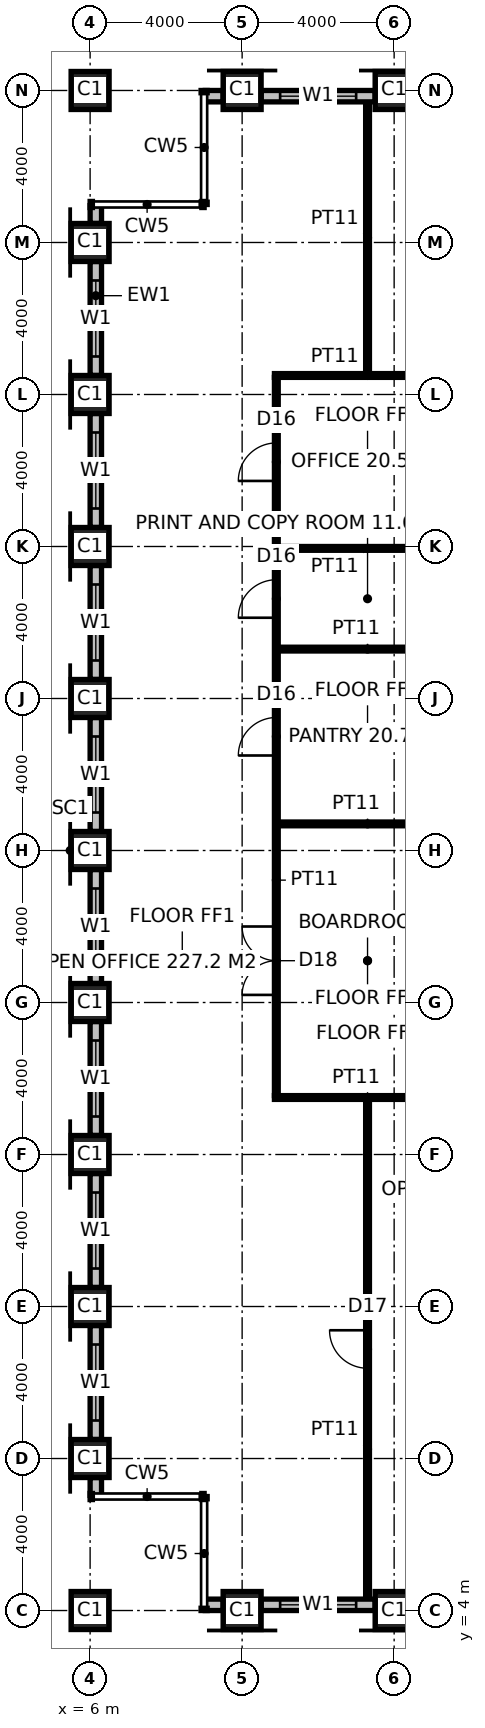
"""IFC4 building model, lengths in metres.
Left out: names, types, materials, properties, quantities, classifications, styles, units other than length and angle.
Written with IfcOpenShell. Run it as: python <this file> out.ifc"""

import sys

from ifc_helpers import new_model, si_unit, direction, frame, frame_2d, origin, origin_2d, place, context, subcontext, project, spatial, rectangle, hollow_rectangle, extrude, element, fill, save


model = new_model("IFC4")
c1 = context("Model", 3, precision=1e-05, world=origin(), true_north=direction((0.0, 1.0)))
c2 = subcontext(c1, "Body", "Model", "MODEL_VIEW")
j1 = project(units=[si_unit("LENGTHUNIT", "METRE"), si_unit("PLANEANGLEUNIT", "RADIAN")], contexts=[c1])
p1 = place(None, origin())
s1 = spatial("IfcSite", under=j1, at=p1, CompositionType="ELEMENT")
p2 = place(p1, origin())
s2 = spatial("IfcBuilding", under=s1, at=p2, CompositionType="ELEMENT")
p3 = place(p2, frame((0.0, 0.0, 274.2)))
s3 = spatial("IfcBuildingStorey", under=s2, at=p3, CompositionType="ELEMENT", Elevation=274.2)
for number, where, z_axis, x_axis in (
    (1, (6.0, 4.0, 0.0), (0.0, 0.0, 1.0), (1.0, 0.0, 0.0)),
    (2, (6.0, 8.0, 0.0), (0.0, 0.0, 1.0), (1.0, 0.0, 0.0)),
    (3, (6.0, 12.0, 0.0), (0.0, 0.0, 1.0), (1.0, 0.0, 0.0)),
    (4, (6.0, 16.0, 0.0), (0.0, 0.0, 1.0), (1.0, 0.0, 0.0)),
    (5, (6.0, 20.0, 0.0), (0.0, 0.0, 1.0), (1.0, 0.0, 0.0)),
    (6, (6.0, 24.0, 0.0), (0.0, 0.0, 1.0), (1.0, 0.0, 0.0)),
    (7, (6.0, 28.0, 0.0), (0.0, 0.0, 1.0), (1.0, 0.0, 0.0)),
    (8, (6.0, 32.0, 0.0), (0.0, 0.0, 1.0), (1.0, 0.0, 0.0)),
    (9, (6.0, 36.0, 0.0), (0.0, 0.0, 1.0), (1.0, 0.0, 0.0)),
    (10, (6.0, 40.0, 0.0), (0.0, 0.0, 1.0), (1.0, 0.0, 0.0)),
    (11, (6.0, 44.0, 0.0), (0.0, 0.0, 1.0), (1.0, 0.0, 0.0)),
    (12, (10.0, 4.0, 0.0), (0.0, 0.0, 1.0), (1.0, 0.0, 0.0)),
    (13, (10.0, 44.0, 0.0), (0.0, 0.0, 1.0), (1.0, 0.0, 0.0)),
    (14, (14.0, 4.0, 0.0), (0.0, 0.0, 1.0), (1.0, 0.0, 0.0)),
    (15, (14.0, 44.0, 0.0), (0.0, 0.0, 1.0), (1.0, 0.0, 0.0)),
):
    element("IfcColumn", number, at=place(p3, frame(where, z_axis=z_axis, x_axis=x_axis)), inside=s3, PredefinedType="COLUMN", context=c2, shape_type="SweptSolid", body=[
        extrude(hollow_rectangle(XDim=1.0, YDim=1.0, WallThickness=0.1, at=origin_2d()), origin(), (0.0, 0.0, 1.0), 4.0),
    ])
p4 = place(p3, frame((10.85, 17.5, 0.0), z_axis=(0.0, 0.0, 1.0), x_axis=(1.0, 0.0, 0.0)))
e16 = element("IfcWall", 16, at=p4, inside=s3, PredefinedType="PARTITIONING", context=c2, shape_type="SweptSolid", body=[
    extrude(rectangle(XDim=4.9, YDim=0.1, at=frame_2d((2.45, 0.0))), origin(), (0.0, 0.0, 1.0), 3.85),
])
for number, where, z_axis, x_axis in (
    (17, (10.95, 24.7, 0.0), (0.0, 0.0, 1.0), (1.0, 0.0, 0.0)),
    (18, (10.95, 29.3, 0.0), (0.0, 0.0, 1.0), (1.0, 0.0, 0.0)),
):
    element("IfcWall", number, at=place(p3, frame(where, z_axis=z_axis, x_axis=x_axis)), inside=s3, PredefinedType="PARTITIONING", context=c2, shape_type="SweptSolid", body=[
        extrude(rectangle(XDim=4.7, YDim=0.1, at=frame_2d((2.35, 0.0))), origin(), (0.0, 0.0, 1.0), 3.85),
    ])
p5 = place(p3, frame((10.95, 31.95, 0.0), z_axis=(0.0, 0.0, 1.0), x_axis=(1.0, 0.0, 0.0)))
e19 = element("IfcWall", 19, at=p5, inside=s3, PredefinedType="PARTITIONING", context=c2, shape_type="SweptSolid", body=[
    extrude(rectangle(XDim=4.7, YDim=0.1, at=frame_2d((2.35, 0.0))), origin(), (0.0, 0.0, 1.0), 2.95),
])
p6 = place(p3, frame((10.85, 36.5, 0.0), z_axis=(0.0, 0.0, 1.0), x_axis=(1.0, 0.0, 0.0)))
e20 = element("IfcWall", 20, at=p6, inside=s3, PredefinedType="PARTITIONING", context=c2, shape_type="SweptSolid", body=[
    extrude(rectangle(XDim=4.9, YDim=0.1, at=frame_2d((2.45, 0.0))), origin(), (0.0, 0.0, 1.0), 2.85),
])
p7 = place(p3, frame((10.9, 17.55, 0.0), z_axis=(0.0, 0.0, 1.0), x_axis=(0.0, 1.0, 0.0)))
e21 = element("IfcWall", 21, at=p7, inside=s3, PredefinedType="PARTITIONING", context=c2, shape_type="SweptSolid", body=[
    extrude(rectangle(XDim=18.9, YDim=0.1, at=frame_2d((9.45, 0.0))), origin(), (0.0, 0.0, 1.0), 3.85),
])
p8 = place(p7, frame((2.65, 0.0, 0.0)))
e22 = element("IfcOpeningElement", 22, at=p8, cuts=e21, PredefinedType="OPENING", context=c2, shape_type="SweptSolid", body=[
    extrude(rectangle(XDim=1.8, YDim=2.4, at=frame_2d((0.9, 1.2))), frame((0.0, 0.06, 0.0), z_axis=(0.0, -1.0, 0.0), x_axis=(1.0, 0.0, 0.0)), (0.0, 0.0, 1.0), 0.12),
])
p9 = place(p7, frame((8.95, 0.0, 0.0)))
e23 = element("IfcOpeningElement", 23, at=p9, cuts=e21, PredefinedType="OPENING", context=c2, shape_type="SweptSolid", body=[
    extrude(rectangle(XDim=1.0, YDim=2.2, at=frame_2d((0.5, 1.1))), frame((0.0, 0.06, 0.0), z_axis=(0.0, -1.0, 0.0), x_axis=(1.0, 0.0, 0.0)), (0.0, 0.0, 1.0), 0.12),
])
p10 = place(p7, frame((12.575, 0.0, 0.0)))
e24 = element("IfcOpeningElement", 24, at=p10, cuts=e21, PredefinedType="OPENING", context=c2, shape_type="SweptSolid", body=[
    extrude(rectangle(XDim=1.0, YDim=2.2, at=frame_2d((0.5, 1.1))), frame((0.0, 0.06, 0.0), z_axis=(0.0, -1.0, 0.0), x_axis=(1.0, 0.0, 0.0)), (0.0, 0.0, 1.0), 0.12),
])
p11 = place(p7, frame((16.175, 0.0, 0.0)))
e25 = element("IfcOpeningElement", 25, at=p11, cuts=e21, PredefinedType="OPENING", context=c2, shape_type="SweptSolid", body=[
    extrude(rectangle(XDim=1.0, YDim=2.2, at=frame_2d((0.5, 1.1))), frame((0.0, 0.06, 0.0), z_axis=(0.0, -1.0, 0.0), x_axis=(1.0, 0.0, 0.0)), (0.0, 0.0, 1.0), 0.12),
])
p12 = place(p3, frame((13.3, 4.3, 0.0), z_axis=(0.0, 0.0, 1.0), x_axis=(0.0, 1.0, 0.0)))
e26 = element("IfcWall", 26, at=p12, inside=s3, PredefinedType="PARTITIONING", context=c2, shape_type="SweptSolid", body=[
    extrude(rectangle(XDim=13.15, YDim=0.1, at=frame_2d((6.575, 0.0))), origin(), (0.0, 0.0, 1.0), 3.85),
])
p13 = place(p12, frame((6.075, 0.0, 0.0)))
e27 = element("IfcOpeningElement", 27, at=p13, cuts=e26, PredefinedType="OPENING", context=c2, shape_type="SweptSolid", body=[
    extrude(rectangle(XDim=1.0, YDim=2.2, at=frame_2d((0.5, 1.1))), frame((0.0, 0.06, 0.0), z_axis=(0.0, -1.0, 0.0), x_axis=(1.0, 0.0, 0.0)), (0.0, 0.0, 1.0), 0.12),
])
p14 = place(p3, frame((13.3, 36.55, 0.0), z_axis=(0.0, 0.0, 1.0), x_axis=(0.0, 1.0, 0.0)))
e28 = element("IfcWall", 28, at=p14, inside=s3, PredefinedType="PARTITIONING", context=c2, shape_type="SweptSolid", body=[
    extrude(rectangle(XDim=7.15, YDim=0.1, at=frame_2d((3.575, 0.0))), origin(), (0.0, 0.0, 1.0), 3.85),
])
p15 = place(p3, frame((9.03, 4.15, 0.0), z_axis=(0.0, 0.0, 1.0), x_axis=(1.0, 0.0, 0.0)))
e29 = element("IfcWall", 29, at=p15, inside=s3, PredefinedType="ELEMENTEDWALL", context=c2, shape_type="SweptSolid", body=[
    extrude(rectangle(XDim=0.47, YDim=0.3, at=frame_2d((0.235, 0.0))), origin(), (0.0, 0.0, 1.0), 2.95),
])
p16 = place(p3, frame((10.5, 4.15, 0.0), z_axis=(0.0, 0.0, 1.0), x_axis=(1.0, 0.0, 0.0)))
e30 = element("IfcWall", 30, at=p16, inside=s3, PredefinedType="ELEMENTEDWALL", context=c2, shape_type="SweptSolid", body=[
    extrude(rectangle(XDim=3.0, YDim=0.3, at=frame_2d((1.5, 0.0))), origin(), (0.0, 0.0, 1.0), 2.85),
])
p17 = place(p16, frame((0.5, 0.0, 0.8)))
e31 = element("IfcOpeningElement", 31, at=p17, cuts=e30, PredefinedType="OPENING", context=c2, shape_type="SweptSolid", body=[
    extrude(rectangle(XDim=2.0, YDim=2.0, at=frame_2d((1.0, 1.0))), frame((0.0, 0.16, 0.0), z_axis=(0.0, -1.0, 0.0), x_axis=(1.0, 0.0, 0.0)), (0.0, 0.0, 1.0), 0.32),
])
p18 = place(p3, frame((9.5, 43.85, 0.0), z_axis=(0.0, 0.0, 1.0), x_axis=(-1.0, 0.0, 0.0)))
e32 = element("IfcWall", 32, at=p18, inside=s3, PredefinedType="ELEMENTEDWALL", context=c2, shape_type="SweptSolid", body=[
    extrude(rectangle(XDim=0.47, YDim=0.3, at=frame_2d((0.235, 0.0))), origin(), (0.0, 0.0, 1.0), 2.95),
])
p19 = place(p3, frame((13.5, 43.85, 0.0), z_axis=(0.0, 0.0, 1.0), x_axis=(-1.0, 0.0, 0.0)))
e33 = element("IfcWall", 33, at=p19, inside=s3, PredefinedType="ELEMENTEDWALL", context=c2, shape_type="SweptSolid", body=[
    extrude(rectangle(XDim=3.0, YDim=0.3, at=frame_2d((1.5, 0.0))), origin(), (0.0, 0.0, 1.0), 2.85),
])
p20 = place(p19, frame((0.5, 0.0, 0.8)))
e34 = element("IfcOpeningElement", 34, at=p20, cuts=e33, PredefinedType="OPENING", context=c2, shape_type="SweptSolid", body=[
    extrude(rectangle(XDim=2.0, YDim=2.0, at=frame_2d((1.0, 1.0))), frame((0.0, 0.16, 0.0), z_axis=(0.0, -1.0, 0.0), x_axis=(1.0, 0.0, 0.0)), (0.0, 0.0, 1.0), 0.32),
])
p21 = place(p3, frame((6.15, 7.5, 0.0), z_axis=(0.0, 0.0, 1.0), x_axis=(0.0, -1.0, 0.0)))
e35 = element("IfcWall", 35, at=p21, inside=s3, PredefinedType="ELEMENTEDWALL", context=c2, shape_type="SweptSolid", body=[
    extrude(rectangle(XDim=0.47, YDim=0.3, at=frame_2d((0.235, 0.0))), origin(), (0.0, 0.0, 1.0), 2.95),
])
p22 = place(p3, frame((6.15, 11.5, 0.0), z_axis=(0.0, 0.0, 1.0), x_axis=(0.0, -1.0, 0.0)))
e36 = element("IfcWall", 36, at=p22, inside=s3, PredefinedType="ELEMENTEDWALL", context=c2, shape_type="SweptSolid", body=[
    extrude(rectangle(XDim=3.0, YDim=0.3, at=frame_2d((1.5, 0.0))), origin(), (0.0, 0.0, 1.0), 2.85),
])
p23 = place(p22, frame((0.5, 0.0, 0.8)))
e37 = element("IfcOpeningElement", 37, at=p23, cuts=e36, PredefinedType="OPENING", context=c2, shape_type="SweptSolid", body=[
    extrude(rectangle(XDim=2.0, YDim=2.0, at=frame_2d((1.0, 1.0))), frame((0.0, 0.16, 0.0), z_axis=(0.0, -1.0, 0.0), x_axis=(1.0, 0.0, 0.0)), (0.0, 0.0, 1.0), 0.32),
])
p24 = place(p3, frame((6.15, 15.5, 0.0), z_axis=(0.0, 0.0, 1.0), x_axis=(0.0, -1.0, 0.0)))
e38 = element("IfcWall", 38, at=p24, inside=s3, PredefinedType="ELEMENTEDWALL", context=c2, shape_type="SweptSolid", body=[
    extrude(rectangle(XDim=3.0, YDim=0.3, at=frame_2d((1.5, 0.0))), origin(), (0.0, 0.0, 1.0), 2.85),
])
p25 = place(p24, frame((0.5, 0.0, 0.8)))
e39 = element("IfcOpeningElement", 39, at=p25, cuts=e38, PredefinedType="OPENING", context=c2, shape_type="SweptSolid", body=[
    extrude(rectangle(XDim=2.0, YDim=2.0, at=frame_2d((1.0, 1.0))), frame((0.0, 0.16, 0.0), z_axis=(0.0, -1.0, 0.0), x_axis=(1.0, 0.0, 0.0)), (0.0, 0.0, 1.0), 0.32),
])
p26 = place(p3, frame((6.15, 19.5, 0.0), z_axis=(0.0, 0.0, 1.0), x_axis=(0.0, -1.0, 0.0)))
e40 = element("IfcWall", 40, at=p26, inside=s3, PredefinedType="ELEMENTEDWALL", context=c2, shape_type="SweptSolid", body=[
    extrude(rectangle(XDim=3.0, YDim=0.3, at=frame_2d((1.5, 0.0))), origin(), (0.0, 0.0, 1.0), 2.85),
])
p27 = place(p26, frame((0.5, 0.0, 0.8)))
e41 = element("IfcOpeningElement", 41, at=p27, cuts=e40, PredefinedType="OPENING", context=c2, shape_type="SweptSolid", body=[
    extrude(rectangle(XDim=2.0, YDim=2.0, at=frame_2d((1.0, 1.0))), frame((0.0, 0.16, 0.0), z_axis=(0.0, -1.0, 0.0), x_axis=(1.0, 0.0, 0.0)), (0.0, 0.0, 1.0), 0.32),
])
p28 = place(p3, frame((6.15, 23.5, 0.0), z_axis=(0.0, 0.0, 1.0), x_axis=(0.0, -1.0, 0.0)))
e42 = element("IfcWall", 42, at=p28, inside=s3, PredefinedType="ELEMENTEDWALL", context=c2, shape_type="SweptSolid", body=[
    extrude(rectangle(XDim=3.0, YDim=0.3, at=frame_2d((1.5, 0.0))), origin(), (0.0, 0.0, 1.0), 2.85),
])
p29 = place(p28, frame((0.5, 0.0, 0.8)))
e43 = element("IfcOpeningElement", 43, at=p29, cuts=e42, PredefinedType="OPENING", context=c2, shape_type="SweptSolid", body=[
    extrude(rectangle(XDim=2.0, YDim=2.0, at=frame_2d((1.0, 1.0))), frame((0.0, 0.16, 0.0), z_axis=(0.0, -1.0, 0.0), x_axis=(1.0, 0.0, 0.0)), (0.0, 0.0, 1.0), 0.32),
])
p30 = place(p3, frame((6.15, 27.5, 0.0), z_axis=(0.0, 0.0, 1.0), x_axis=(0.0, -1.0, 0.0)))
e44 = element("IfcWall", 44, at=p30, inside=s3, PredefinedType="ELEMENTEDWALL", context=c2, shape_type="SweptSolid", body=[
    extrude(rectangle(XDim=3.0, YDim=0.3, at=frame_2d((1.5, 0.0))), origin(), (0.0, 0.0, 1.0), 2.85),
])
p31 = place(p30, frame((0.5, 0.0, 0.8)))
e45 = element("IfcOpeningElement", 45, at=p31, cuts=e44, PredefinedType="OPENING", context=c2, shape_type="SweptSolid", body=[
    extrude(rectangle(XDim=2.0, YDim=2.0, at=frame_2d((1.0, 1.0))), frame((0.0, 0.16, 0.0), z_axis=(0.0, -1.0, 0.0), x_axis=(1.0, 0.0, 0.0)), (0.0, 0.0, 1.0), 0.32),
])
p32 = place(p3, frame((6.15, 31.5, 0.0), z_axis=(0.0, 0.0, 1.0), x_axis=(0.0, -1.0, 0.0)))
e46 = element("IfcWall", 46, at=p32, inside=s3, PredefinedType="ELEMENTEDWALL", context=c2, shape_type="SweptSolid", body=[
    extrude(rectangle(XDim=3.0, YDim=0.3, at=frame_2d((1.5, 0.0))), origin(), (0.0, 0.0, 1.0), 2.85),
])
p33 = place(p32, frame((0.5, 0.0, 0.8)))
e47 = element("IfcOpeningElement", 47, at=p33, cuts=e46, PredefinedType="OPENING", context=c2, shape_type="SweptSolid", body=[
    extrude(rectangle(XDim=2.0, YDim=2.0, at=frame_2d((1.0, 1.0))), frame((0.0, 0.16, 0.0), z_axis=(0.0, -1.0, 0.0), x_axis=(1.0, 0.0, 0.0)), (0.0, 0.0, 1.0), 0.32),
])
p34 = place(p3, frame((6.15, 35.5, 0.0), z_axis=(0.0, 0.0, 1.0), x_axis=(0.0, -1.0, 0.0)))
e48 = element("IfcWall", 48, at=p34, inside=s3, PredefinedType="ELEMENTEDWALL", context=c2, shape_type="SweptSolid", body=[
    extrude(rectangle(XDim=3.0, YDim=0.3, at=frame_2d((1.5, 0.0))), origin(), (0.0, 0.0, 1.0), 2.85),
])
p35 = place(p34, frame((0.5, 0.0, 0.8)))
e49 = element("IfcOpeningElement", 49, at=p35, cuts=e48, PredefinedType="OPENING", context=c2, shape_type="SweptSolid", body=[
    extrude(rectangle(XDim=2.0, YDim=2.0, at=frame_2d((1.0, 1.0))), frame((0.0, 0.16, 0.0), z_axis=(0.0, -1.0, 0.0), x_axis=(1.0, 0.0, 0.0)), (0.0, 0.0, 1.0), 0.32),
])
p36 = place(p3, frame((6.15, 39.5, 0.0), z_axis=(0.0, 0.0, 1.0), x_axis=(0.0, -1.0, 0.0)))
e50 = element("IfcWall", 50, at=p36, inside=s3, PredefinedType="ELEMENTEDWALL", context=c2, shape_type="SweptSolid", body=[
    extrude(rectangle(XDim=3.0, YDim=0.3, at=frame_2d((1.5, 0.0))), origin(), (0.0, 0.0, 1.0), 2.85),
])
p37 = place(p36, frame((0.5, 0.0, 0.8)))
e51 = element("IfcOpeningElement", 51, at=p37, cuts=e50, PredefinedType="OPENING", context=c2, shape_type="SweptSolid", body=[
    extrude(rectangle(XDim=2.0, YDim=2.0, at=frame_2d((1.0, 1.0))), frame((0.0, 0.16, 0.0), z_axis=(0.0, -1.0, 0.0), x_axis=(1.0, 0.0, 0.0)), (0.0, 0.0, 1.0), 0.32),
])
p38 = place(p3, frame((6.15, 40.97, 0.0), z_axis=(0.0, 0.0, 1.0), x_axis=(0.0, -1.0, 0.0)))
e52 = element("IfcWall", 52, at=p38, inside=s3, PredefinedType="ELEMENTEDWALL", context=c2, shape_type="SweptSolid", body=[
    extrude(rectangle(XDim=0.47, YDim=0.3, at=frame_2d((0.235, 0.0))), origin(), (0.0, 0.0, 1.0), 2.95),
])
p39 = place(p8, origin())
e53 = element("IfcDoor", 53, at=p39, inside=s3, OperationType="DOUBLE_DOOR_DOUBLE_SWING", PredefinedType="DOOR", context=c2, shape_type="SweptSolid", body=[
    extrude(rectangle(XDim=1.8, YDim=2.4, at=frame_2d((0.9, 1.2))), frame((0.0, 0.025, 0.0), z_axis=(0.0, -1.0, 0.0), x_axis=(1.0, 0.0, 0.0)), (0.0, 0.0, 1.0), 0.05),
])
fill(e22, e53)
p40 = place(p9, origin())
e54 = element("IfcDoor", 54, at=p40, inside=s3, OperationType="SINGLE_SWING_LEFT", PredefinedType="DOOR", context=c2, shape_type="SweptSolid", body=[
    extrude(rectangle(XDim=1.0, YDim=2.2, at=frame_2d((0.5, 1.1))), frame((0.0, 0.025, 0.0), z_axis=(0.0, -1.0, 0.0), x_axis=(1.0, 0.0, 0.0)), (0.0, 0.0, 1.0), 0.05),
])
fill(e23, e54)
p41 = place(p10, origin())
e55 = element("IfcDoor", 55, at=p41, inside=s3, OperationType="SINGLE_SWING_LEFT", PredefinedType="DOOR", context=c2, shape_type="SweptSolid", body=[
    extrude(rectangle(XDim=1.0, YDim=2.2, at=frame_2d((0.5, 1.1))), frame((0.0, 0.025, 0.0), z_axis=(0.0, -1.0, 0.0), x_axis=(1.0, 0.0, 0.0)), (0.0, 0.0, 1.0), 0.05),
])
fill(e24, e55)
p42 = place(p11, origin())
e56 = element("IfcDoor", 56, at=p42, inside=s3, OperationType="SINGLE_SWING_LEFT", PredefinedType="DOOR", context=c2, shape_type="SweptSolid", body=[
    extrude(rectangle(XDim=1.0, YDim=2.2, at=frame_2d((0.5, 1.1))), frame((0.0, 0.025, 0.0), z_axis=(0.0, -1.0, 0.0), x_axis=(1.0, 0.0, 0.0)), (0.0, 0.0, 1.0), 0.05),
])
fill(e25, e56)
p43 = place(p13, origin())
e57 = element("IfcDoor", 57, at=p43, inside=s3, OperationType="SINGLE_SWING_RIGHT", PredefinedType="DOOR", context=c2, shape_type="SweptSolid", body=[
    extrude(rectangle(XDim=1.0, YDim=2.2, at=frame_2d((0.5, 1.1))), frame((0.0, 0.025, 0.0), z_axis=(0.0, -1.0, 0.0), x_axis=(1.0, 0.0, 0.0)), (0.0, 0.0, 1.0), 0.05),
])
fill(e27, e57)
p44 = place(p17, origin())
e58 = element("IfcWindow", 58, at=p44, inside=s3, PartitioningType="SINGLE_PANEL", PredefinedType="WINDOW", context=c2, shape_type="SweptSolid", body=[
    extrude(rectangle(XDim=2.0, YDim=2.0, at=frame_2d((1.0, 1.0))), frame((0.0, 0.03, 0.0), z_axis=(0.0, -1.0, 0.0), x_axis=(1.0, 0.0, 0.0)), (0.0, 0.0, 1.0), 0.06),
])
fill(e31, e58)
p45 = place(p20, origin())
e59 = element("IfcWindow", 59, at=p45, inside=s3, PartitioningType="SINGLE_PANEL", PredefinedType="WINDOW", context=c2, shape_type="SweptSolid", body=[
    extrude(rectangle(XDim=2.0, YDim=2.0, at=frame_2d((1.0, 1.0))), frame((0.0, 0.03, 0.0), z_axis=(0.0, -1.0, 0.0), x_axis=(1.0, 0.0, 0.0)), (0.0, 0.0, 1.0), 0.06),
])
fill(e34, e59)
p46 = place(p23, origin())
e60 = element("IfcWindow", 60, at=p46, inside=s3, PartitioningType="SINGLE_PANEL", PredefinedType="WINDOW", context=c2, shape_type="SweptSolid", body=[
    extrude(rectangle(XDim=2.0, YDim=2.0, at=frame_2d((1.0, 1.0))), frame((0.0, 0.03, 0.0), z_axis=(0.0, -1.0, 0.0), x_axis=(1.0, 0.0, 0.0)), (0.0, 0.0, 1.0), 0.06),
])
fill(e37, e60)
p47 = place(p25, origin())
e61 = element("IfcWindow", 61, at=p47, inside=s3, PartitioningType="SINGLE_PANEL", PredefinedType="WINDOW", context=c2, shape_type="SweptSolid", body=[
    extrude(rectangle(XDim=2.0, YDim=2.0, at=frame_2d((1.0, 1.0))), frame((0.0, 0.03, 0.0), z_axis=(0.0, -1.0, 0.0), x_axis=(1.0, 0.0, 0.0)), (0.0, 0.0, 1.0), 0.06),
])
fill(e39, e61)
p48 = place(p27, origin())
e62 = element("IfcWindow", 62, at=p48, inside=s3, PartitioningType="SINGLE_PANEL", PredefinedType="WINDOW", context=c2, shape_type="SweptSolid", body=[
    extrude(rectangle(XDim=2.0, YDim=2.0, at=frame_2d((1.0, 1.0))), frame((0.0, 0.03, 0.0), z_axis=(0.0, -1.0, 0.0), x_axis=(1.0, 0.0, 0.0)), (0.0, 0.0, 1.0), 0.06),
])
fill(e41, e62)
p49 = place(p29, origin())
e63 = element("IfcWindow", 63, at=p49, inside=s3, PartitioningType="SINGLE_PANEL", PredefinedType="WINDOW", context=c2, shape_type="SweptSolid", body=[
    extrude(rectangle(XDim=2.0, YDim=2.0, at=frame_2d((1.0, 1.0))), frame((0.0, 0.03, 0.0), z_axis=(0.0, -1.0, 0.0), x_axis=(1.0, 0.0, 0.0)), (0.0, 0.0, 1.0), 0.06),
])
fill(e43, e63)
p50 = place(p31, origin())
e64 = element("IfcWindow", 64, at=p50, inside=s3, PartitioningType="SINGLE_PANEL", PredefinedType="WINDOW", context=c2, shape_type="SweptSolid", body=[
    extrude(rectangle(XDim=2.0, YDim=2.0, at=frame_2d((1.0, 1.0))), frame((0.0, 0.03, 0.0), z_axis=(0.0, -1.0, 0.0), x_axis=(1.0, 0.0, 0.0)), (0.0, 0.0, 1.0), 0.06),
])
fill(e45, e64)
p51 = place(p33, origin())
e65 = element("IfcWindow", 65, at=p51, inside=s3, PartitioningType="SINGLE_PANEL", PredefinedType="WINDOW", context=c2, shape_type="SweptSolid", body=[
    extrude(rectangle(XDim=2.0, YDim=2.0, at=frame_2d((1.0, 1.0))), frame((0.0, 0.03, 0.0), z_axis=(0.0, -1.0, 0.0), x_axis=(1.0, 0.0, 0.0)), (0.0, 0.0, 1.0), 0.06),
])
fill(e47, e65)
p52 = place(p35, origin())
e66 = element("IfcWindow", 66, at=p52, inside=s3, PartitioningType="SINGLE_PANEL", PredefinedType="WINDOW", context=c2, shape_type="SweptSolid", body=[
    extrude(rectangle(XDim=2.0, YDim=2.0, at=frame_2d((1.0, 1.0))), frame((0.0, 0.03, 0.0), z_axis=(0.0, -1.0, 0.0), x_axis=(1.0, 0.0, 0.0)), (0.0, 0.0, 1.0), 0.06),
])
fill(e49, e66)
p53 = place(p37, origin())
e67 = element("IfcWindow", 67, at=p53, inside=s3, PartitioningType="SINGLE_PANEL", PredefinedType="WINDOW", context=c2, shape_type="SweptSolid", body=[
    extrude(rectangle(XDim=2.0, YDim=2.0, at=frame_2d((1.0, 1.0))), frame((0.0, 0.03, 0.0), z_axis=(0.0, -1.0, 0.0), x_axis=(1.0, 0.0, 0.0)), (0.0, 0.0, 1.0), 0.06),
])
fill(e51, e67)
save(model, sys.argv[1])
